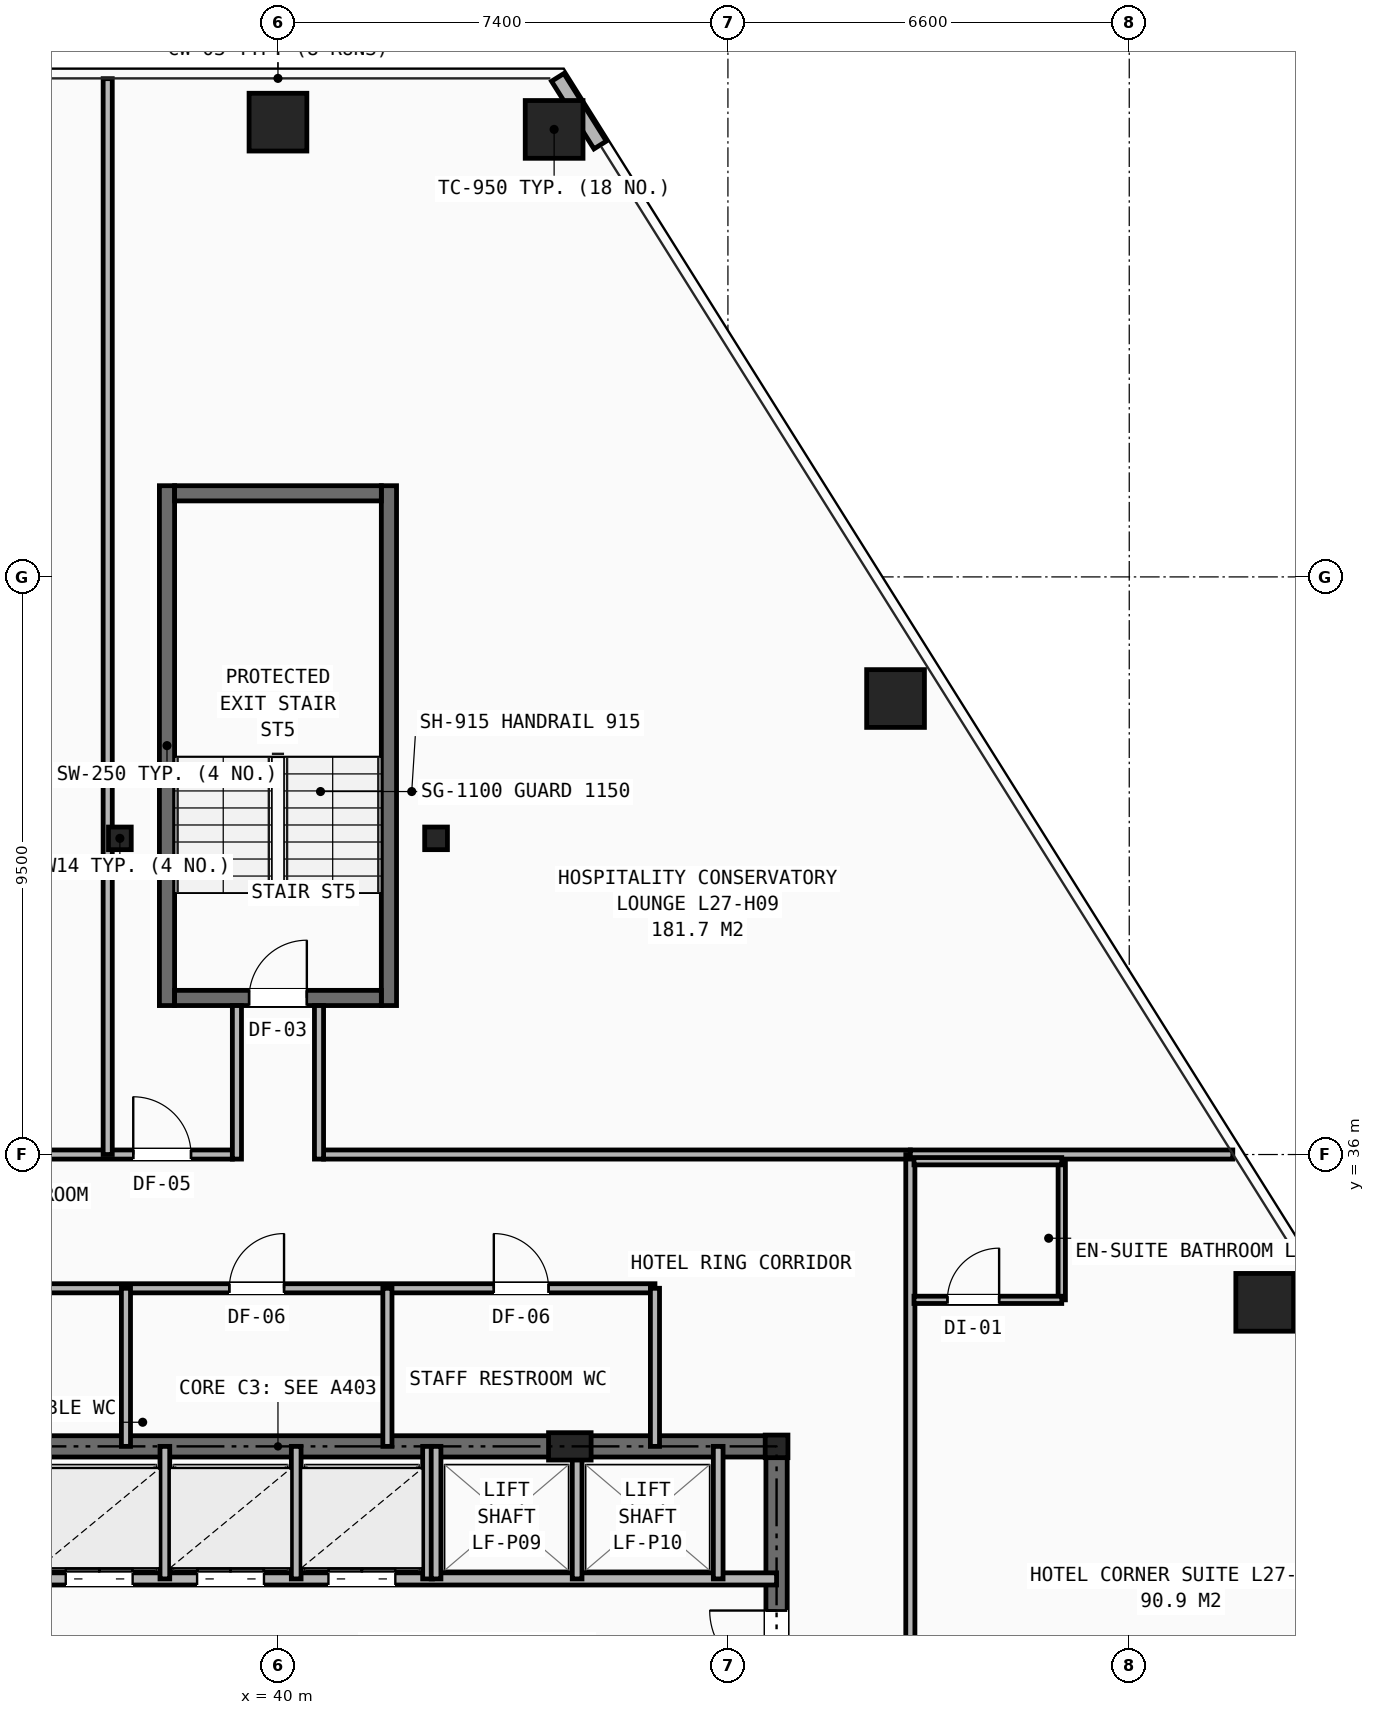
"""IFC4 building model, lengths in metres.
Left out: names, types, materials, properties, quantities, classifications, styles, units other than length and angle.
Written with IfcOpenShell. Run it as: python <this file> out.ifc"""

import sys

from ifc_helpers import new_model, si_unit, direction, frame, frame_2d, origin, origin_2d, place, context, subcontext, project, spatial, rectangle, hollow_rectangle, i_section, extrude, element, fill, save


model = new_model("IFC4")
c1 = context("Model", 3, precision=1e-05, world=origin(), true_north=direction((0.0, 1.0)))
c2 = subcontext(c1, "Body", "Model", "MODEL_VIEW")
j1 = project(units=[si_unit("LENGTHUNIT", "METRE"), si_unit("PLANEANGLEUNIT", "RADIAN")], contexts=[c1])
p1 = place(None, origin())
s1 = spatial("IfcSite", under=j1, at=p1, CompositionType="ELEMENT")
p2 = place(p1, origin())
s2 = spatial("IfcBuilding", under=s1, at=p2, CompositionType="ELEMENT")
p3 = place(p2, frame((0.0, 0.0, 95.8)))
s3 = spatial("IfcBuildingStorey", under=s2, at=p3, CompositionType="ELEMENT", Elevation=95.8)
for number, where, z_axis, x_axis in (
    (1, (48.2, 31.2, 0.0), (0.0, 0.0, 1.0), (1.0, 0.0, 0.0)),
    (2, (37.4, 41.2, 0.0), (0.0, 0.0, 1.0), (1.0, 0.0, 0.0)),
    (3, (42.6, 41.2, 0.0), (0.0, 0.0, 1.0), (1.0, 0.0, 0.0)),
):
    element("IfcColumn", number, at=place(p3, frame(where, z_axis=z_axis, x_axis=x_axis)), inside=s3, PredefinedType="COLUMN", context=c2, shape_type="SweptSolid", body=[
        extrude(i_section(OverallWidth=0.374, OverallDepth=0.372, WebThickness=0.016, FlangeThickness=0.026, at=origin_2d()), origin(), (0.0, 0.0, 1.0), 3.2),
    ])
p4 = place(p3, frame((44.8, 31.2, 0.0), z_axis=(0.0, 0.0, 1.0), x_axis=(1.0, 0.0, 0.0)))
e4 = element("IfcColumn", 4, at=p4, inside=s3, PredefinedType="PILASTER", context=c2, shape_type="SweptSolid", body=[
    extrude(rectangle(XDim=0.7, YDim=0.45, at=origin_2d()), origin(), (0.0, 0.0, 1.0), 3.2),
])
for number, where, z_axis, x_axis in (
    (5, (44.542, 52.86, 0.0), (0.0, 0.0, 1.0), (1.0, 0.0, 0.0)),
    (6, (40.0, 52.979, 0.0), (0.0, 0.0, 1.0), (1.0, 0.0, 0.0)),
    (7, (56.228, 33.569, 0.0), (0.0, 0.0, 1.0), (1.0, 0.0, 0.0)),
    (8, (50.156, 43.5, 0.0), (0.0, 0.0, 1.0), (1.0, 0.0, 0.0)),
):
    element("IfcColumn", number, at=place(p3, frame(where, z_axis=z_axis, x_axis=x_axis)), inside=s3, PredefinedType="COLUMN", context=c2, shape_type="SweptSolid", body=[
        extrude(hollow_rectangle(XDim=0.95, YDim=0.95, WallThickness=0.065, at=origin_2d()), origin(), (0.0, 0.0, 1.0), 3.2),
    ])
p5 = place(p3, frame((45.299, 52.603, 0.0), z_axis=(0.0, 0.0, 1.0), x_axis=(-0.531234768042, 0.847224658059, 0.0)))
e9 = element("IfcWall", 9, at=p5, inside=s3, PredefinedType="SHEAR", context=c2, shape_type="SweptSolid", body=[
    extrude(rectangle(XDim=1.313, YDim=0.24, at=frame_2d((0.657, 0.0))), origin(), (0.0, 0.0, 1.0), 2.253),
])
p6 = place(p3, frame((31.8, 31.2, 0.0), z_axis=(0.0, 0.0, 1.0), x_axis=(1.0, 0.0, 0.0)))
e10 = element("IfcWall", 10, at=p6, inside=s3, PredefinedType="SHEAR", context=c2, shape_type="SweptSolid", body=[
    extrude(rectangle(XDim=16.4, YDim=0.35, at=frame_2d((8.2, 0.0))), origin(), (0.0, 0.0, 1.0), 2.97),
])
p7 = place(p3, frame((48.2, 16.4, 0.0), z_axis=(0.0, 0.0, 1.0), x_axis=(0.0, 1.0, 0.0)))
e11 = element("IfcWall", 11, at=p7, inside=s3, PredefinedType="SHEAR", context=c2, shape_type="SweptSolid", body=[
    extrude(rectangle(XDim=14.8, YDim=0.35, at=frame_2d((7.4, 0.0))), origin(), (0.0, 0.0, 1.0), 2.97),
])
p8 = place(p7, frame((11.0, 0.0, 0.0)))
e12 = element("IfcOpeningElement", 12, at=p8, cuts=e11, PredefinedType="OPENING", context=c2, shape_type="SweptSolid", body=[
    extrude(rectangle(XDim=1.1, YDim=2.15, at=frame_2d((0.55, 1.075))), frame((0.0, 0.185, 0.0), z_axis=(0.0, -1.0, 0.0), x_axis=(1.0, 0.0, 0.0)), (0.0, 0.0, 1.0), 0.37),
])
p9 = place(p3, frame((33.82, 29.02, 0.0), z_axis=(0.0, 0.0, 1.0), x_axis=(1.0, 0.0, 0.0)))
e13 = element("IfcWall", 13, at=p9, inside=s3, PredefinedType="SOLIDWALL", context=c2, shape_type="SweptSolid", body=[
    extrude(rectangle(XDim=14.38, YDim=0.2, at=frame_2d((7.19, 0.0))), origin(), (0.0, 0.0, 1.0), 2.421),
])
p10 = place(p9, frame((0.53, 0.0, 0.0)))
e14 = element("IfcOpeningElement", 14, at=p10, cuts=e13, PredefinedType="OPENING", context=c2, shape_type="SweptSolid", body=[
    extrude(rectangle(XDim=1.1, YDim=2.15, at=frame_2d((0.55, 1.075))), frame((0.0, 0.11, 0.0), z_axis=(0.0, -1.0, 0.0), x_axis=(1.0, 0.0, 0.0)), (0.0, 0.0, 1.0), 0.22),
])
p11 = place(p9, frame((2.69, 0.0, 0.0)))
e15 = element("IfcOpeningElement", 15, at=p11, cuts=e13, PredefinedType="OPENING", context=c2, shape_type="SweptSolid", body=[
    extrude(rectangle(XDim=1.1, YDim=2.15, at=frame_2d((0.55, 1.075))), frame((0.0, 0.11, 0.0), z_axis=(0.0, -1.0, 0.0), x_axis=(1.0, 0.0, 0.0)), (0.0, 0.0, 1.0), 0.22),
])
p12 = place(p9, frame((4.85, 0.0, 0.0)))
e16 = element("IfcOpeningElement", 16, at=p12, cuts=e13, PredefinedType="OPENING", context=c2, shape_type="SweptSolid", body=[
    extrude(rectangle(XDim=1.1, YDim=2.15, at=frame_2d((0.55, 1.075))), frame((0.0, 0.11, 0.0), z_axis=(0.0, -1.0, 0.0), x_axis=(1.0, 0.0, 0.0)), (0.0, 0.0, 1.0), 0.22),
])
p13 = place(p9, frame((7.01, 0.0, 0.0)))
e17 = element("IfcOpeningElement", 17, at=p13, cuts=e13, PredefinedType="OPENING", context=c2, shape_type="SweptSolid", body=[
    extrude(rectangle(XDim=1.1, YDim=2.15, at=frame_2d((0.55, 1.075))), frame((0.0, 0.11, 0.0), z_axis=(0.0, -1.0, 0.0), x_axis=(1.0, 0.0, 0.0)), (0.0, 0.0, 1.0), 0.22),
])
for number, where, z_axis, x_axis in (
    (18, (38.14, 29.02, 0.0), (0.0, 0.0, 1.0), (0.0, 1.0, 0.0)),
    (19, (40.3, 29.02, 0.0), (0.0, 0.0, 1.0), (0.0, 1.0, 0.0)),
    (20, (42.46, 29.02, 0.0), (0.0, 0.0, 1.0), (0.0, 1.0, 0.0)),
    (21, (42.6, 29.02, 0.0), (0.0, 0.0, 1.0), (0.0, 1.0, 0.0)),
    (22, (44.92, 29.02, 0.0), (0.0, 0.0, 1.0), (0.0, 1.0, 0.0)),
    (23, (47.24, 29.02, 0.0), (0.0, 0.0, 1.0), (0.0, 1.0, 0.0)),
):
    element("IfcWall", number, at=place(p3, frame(where, z_axis=z_axis, x_axis=x_axis)), inside=s3, PredefinedType="SOLIDWALL", context=c2, shape_type="SweptSolid", body=[
        extrude(rectangle(XDim=2.18, YDim=0.16, at=frame_2d((1.09, 0.0))), origin(), (0.0, 0.0, 1.0), 2.421),
    ])
p14 = place(p3, frame((33.2, 33.8, 0.0), z_axis=(0.0, 0.0, 1.0), x_axis=(1.0, 0.0, 0.0)))
e24 = element("IfcWall", 24, at=p14, inside=s3, PredefinedType="PARTITIONING", context=c2, shape_type="SweptSolid", body=[
    extrude(rectangle(XDim=13.0, YDim=0.15, at=frame_2d((6.5, 0.0))), origin(), (0.0, 0.0, 1.0), 2.97),
])
p15 = place(p14, frame((1.7, 0.0, 0.0)))
e25 = element("IfcOpeningElement", 25, at=p15, cuts=e24, PredefinedType="OPENING", context=c2, shape_type="SweptSolid", body=[
    extrude(rectangle(XDim=0.9, YDim=2.1, at=frame_2d((0.45, 1.05))), frame((0.0, 0.085, 0.0), z_axis=(0.0, -1.0, 0.0), x_axis=(1.0, 0.0, 0.0)), (0.0, 0.0, 1.0), 0.17),
])
p16 = place(p14, frame((6.0, 0.0, 0.0)))
e26 = element("IfcOpeningElement", 26, at=p16, cuts=e24, PredefinedType="OPENING", context=c2, shape_type="SweptSolid", body=[
    extrude(rectangle(XDim=0.9, YDim=2.1, at=frame_2d((0.45, 1.05))), frame((0.0, 0.085, 0.0), z_axis=(0.0, -1.0, 0.0), x_axis=(1.0, 0.0, 0.0)), (0.0, 0.0, 1.0), 0.17),
])
p17 = place(p14, frame((10.35, 0.0, 0.0)))
e27 = element("IfcOpeningElement", 27, at=p17, cuts=e24, PredefinedType="OPENING", context=c2, shape_type="SweptSolid", body=[
    extrude(rectangle(XDim=0.9, YDim=2.1, at=frame_2d((0.45, 1.05))), frame((0.0, 0.085, 0.0), z_axis=(0.0, -1.0, 0.0), x_axis=(1.0, 0.0, 0.0)), (0.0, 0.0, 1.0), 0.17),
])
for number, where, z_axis, x_axis in (
    (28, (46.2, 31.2, 0.0), (0.0, 0.0, 1.0), (0.0, 1.0, 0.0)),
    (29, (37.5, 31.2, 0.0), (0.0, 0.0, 1.0), (0.0, 1.0, 0.0)),
    (30, (41.8, 31.2, 0.0), (0.0, 0.0, 1.0), (0.0, 1.0, 0.0)),
):
    element("IfcWall", number, at=place(p3, frame(where, z_axis=z_axis, x_axis=x_axis)), inside=s3, PredefinedType="PARTITIONING", context=c2, shape_type="SweptSolid", body=[
        extrude(rectangle(XDim=2.6, YDim=0.15, at=frame_2d((1.3, 0.0))), origin(), (0.0, 0.0, 1.0), 2.421),
    ])
p18 = place(p3, frame((29.6, 36.0, 0.0), z_axis=(0.0, 0.0, 1.0), x_axis=(1.0, 0.0, 0.0)))
e31 = element("IfcWall", 31, at=p18, inside=s3, PredefinedType="PARTITIONING", context=c2, shape_type="SweptSolid", body=[
    extrude(rectangle(XDim=9.65, YDim=0.15, at=frame_2d((4.825, 0.0))), origin(), (0.0, 0.0, 1.0), 2.503),
])
p19 = place(p18, frame((0.57, 0.0, 0.0)))
e32 = element("IfcOpeningElement", 32, at=p19, cuts=e31, PredefinedType="OPENING", context=c2, shape_type="SweptSolid", body=[
    extrude(rectangle(XDim=0.95, YDim=2.1, at=frame_2d((0.475, 1.05))), frame((0.0, 0.085, 0.0), z_axis=(0.0, -1.0, 0.0), x_axis=(1.0, 0.0, 0.0)), (0.0, 0.0, 1.0), 0.17),
])
p20 = place(p18, frame((8.02, 0.0, 0.0)))
e33 = element("IfcOpeningElement", 33, at=p20, cuts=e31, PredefinedType="OPENING", context=c2, shape_type="SweptSolid", body=[
    extrude(rectangle(XDim=0.95, YDim=2.1, at=frame_2d((0.475, 1.05))), frame((0.0, 0.085, 0.0), z_axis=(0.0, -1.0, 0.0), x_axis=(1.0, 0.0, 0.0)), (0.0, 0.0, 1.0), 0.17),
])
p21 = place(p3, frame((40.75, 36.0, 0.0), z_axis=(0.0, 0.0, 1.0), x_axis=(1.0, 0.0, 0.0)))
e34 = element("IfcWall", 34, at=p21, inside=s3, PredefinedType="PARTITIONING", context=c2, shape_type="SweptSolid", body=[
    extrude(rectangle(XDim=9.65, YDim=0.15, at=frame_2d((4.825, 0.0))), origin(), (0.0, 0.0, 1.0), 2.503),
])
p22 = place(p3, frame((50.4, 14.1, 0.0), z_axis=(0.0, 0.0, 1.0), x_axis=(0.0, 1.0, 0.0)))
e35 = element("IfcWall", 35, at=p22, inside=s3, PredefinedType="PARTITIONING", context=c2, shape_type="SweptSolid", body=[
    extrude(rectangle(XDim=21.9, YDim=0.15, at=frame_2d((10.95, 0.0))), origin(), (0.0, 0.0, 1.0), 2.421),
])
p23 = place(p22, frame((0.42, 0.0, 0.0)))
e36 = element("IfcOpeningElement", 36, at=p23, cuts=e35, PredefinedType="OPENING", context=c2, shape_type="SweptSolid", body=[
    extrude(rectangle(XDim=0.95, YDim=2.1, at=frame_2d((0.475, 1.05))), frame((0.0, 0.085, 0.0), z_axis=(0.0, -1.0, 0.0), x_axis=(1.0, 0.0, 0.0)), (0.0, 0.0, 1.0), 0.17),
])
p24 = place(p22, frame((10.82, 0.0, 0.0)))
e37 = element("IfcOpeningElement", 37, at=p24, cuts=e35, PredefinedType="OPENING", context=c2, shape_type="SweptSolid", body=[
    extrude(rectangle(XDim=0.95, YDim=2.1, at=frame_2d((0.475, 1.05))), frame((0.0, 0.085, 0.0), z_axis=(0.0, -1.0, 0.0), x_axis=(1.0, 0.0, 0.0)), (0.0, 0.0, 1.0), 0.17),
])
p25 = place(p3, frame((50.4, 36.0, 0.0), z_axis=(0.0, 0.0, 1.0), x_axis=(1.0, 0.0, 0.0)))
e38 = element("IfcWall", 38, at=p25, inside=s3, PredefinedType="PARTITIONING", context=c2, shape_type="SweptSolid", body=[
    extrude(rectangle(XDim=5.303, YDim=0.15, at=frame_2d((2.651, 0.0))), origin(), (0.0, 0.0, 1.0), 2.258),
])
p26 = place(p3, frame((52.89, 33.61, 0.0), z_axis=(0.0, 0.0, 1.0), x_axis=(0.0, 1.0, 0.0)))
e39 = element("IfcWall", 39, at=p26, inside=s3, PredefinedType="PARTITIONING", context=c2, shape_type="SweptSolid", body=[
    extrude(rectangle(XDim=2.28, YDim=0.12, at=frame_2d((1.14, 0.0))), origin(), (0.0, 0.0, 1.0), 2.97),
])
p27 = place(p3, frame((50.46, 33.61, 0.0), z_axis=(0.0, 0.0, 1.0), x_axis=(1.0, 0.0, 0.0)))
e40 = element("IfcWall", 40, at=p27, inside=s3, PredefinedType="PARTITIONING", context=c2, shape_type="SweptSolid", body=[
    extrude(rectangle(XDim=2.43, YDim=0.12, at=frame_2d((1.215, 0.0))), origin(), (0.0, 0.0, 1.0), 2.503),
])
p28 = place(p27, frame((0.55, 0.0, 0.0)))
e41 = element("IfcOpeningElement", 41, at=p28, cuts=e40, PredefinedType="OPENING", context=c2, shape_type="SweptSolid", body=[
    extrude(rectangle(XDim=0.85, YDim=2.05, at=frame_2d((0.425, 1.025))), frame((0.0, 0.07, 0.0), z_axis=(0.0, -1.0, 0.0), x_axis=(1.0, 0.0, 0.0)), (0.0, 0.0, 1.0), 0.14),
])
p29 = place(p3, frame((50.46, 35.89, 0.0), z_axis=(0.0, 0.0, 1.0), x_axis=(1.0, 0.0, 0.0)))
e42 = element("IfcWall", 42, at=p29, inside=s3, PredefinedType="PARTITIONING", context=c2, shape_type="SweptSolid", body=[
    extrude(rectangle(XDim=2.43, YDim=0.12, at=frame_2d((1.215, 0.0))), origin(), (0.0, 0.0, 1.0), 2.97),
])
p30 = place(p3, frame((37.2, 36.0, 0.0), z_axis=(0.0, 0.0, 1.0), x_axis=(0.0, 1.0, 0.0)))
e43 = element("IfcWall", 43, at=p30, inside=s3, PredefinedType="PARTITIONING", context=c2, shape_type="SweptSolid", body=[
    extrude(rectangle(XDim=17.694, YDim=0.15, at=frame_2d((8.847, 0.0))), origin(), (0.0, 0.0, 1.0), 2.258),
])
for number, where, z_axis, x_axis in (
    (44, (38.175, 38.45, 0.0), (0.0, 0.0, 1.0), (0.0, 1.0, 0.0)),
    (45, (41.825, 38.45, 0.0), (0.0, 0.0, 1.0), (0.0, 1.0, 0.0)),
):
    element("IfcWall", number, at=place(p3, frame(where, z_axis=z_axis, x_axis=x_axis)), inside=s3, PredefinedType="SHEAR", context=c2, shape_type="SweptSolid", body=[
        extrude(rectangle(XDim=8.55, YDim=0.25, at=frame_2d((4.275, 0.0))), origin(), (0.0, 0.0, 1.0), 2.97),
    ])
p31 = place(p3, frame((38.3, 38.575, 0.0), z_axis=(0.0, 0.0, 1.0), x_axis=(1.0, 0.0, 0.0)))
e46 = element("IfcWall", 46, at=p31, inside=s3, PredefinedType="SHEAR", context=c2, shape_type="SweptSolid", body=[
    extrude(rectangle(XDim=3.4, YDim=0.25, at=frame_2d((1.7, 0.0))), origin(), (0.0, 0.0, 1.0), 2.97),
])
p32 = place(p31, frame((1.225, 0.0, 0.0)))
e47 = element("IfcOpeningElement", 47, at=p32, cuts=e46, PredefinedType="OPENING", context=c2, shape_type="SweptSolid", body=[
    extrude(rectangle(XDim=0.95, YDim=2.1, at=frame_2d((0.475, 1.05))), frame((0.0, 0.135, 0.0), z_axis=(0.0, -1.0, 0.0), x_axis=(1.0, 0.0, 0.0)), (0.0, 0.0, 1.0), 0.27),
])
p33 = place(p3, frame((38.3, 46.875, 0.0), z_axis=(0.0, 0.0, 1.0), x_axis=(1.0, 0.0, 0.0)))
e48 = element("IfcWall", 48, at=p33, inside=s3, PredefinedType="SHEAR", context=c2, shape_type="SweptSolid", body=[
    extrude(rectangle(XDim=3.4, YDim=0.25, at=frame_2d((1.7, 0.0))), origin(), (0.0, 0.0, 1.0), 2.97),
])
for number, where, z_axis, x_axis in (
    (49, (39.325, 35.925, 0.0), (0.0, 0.0, 1.0), (0.0, 1.0, 0.0)),
    (50, (40.675, 35.925, 0.0), (0.0, 0.0, 1.0), (0.0, 1.0, 0.0)),
):
    element("IfcWall", number, at=place(p3, frame(where, z_axis=z_axis, x_axis=x_axis)), inside=s3, PredefinedType="PARTITIONING", context=c2, shape_type="SweptSolid", body=[
        extrude(rectangle(XDim=2.525, YDim=0.15, at=frame_2d((1.262, 0.0))), origin(), (0.0, 0.0, 1.0), 2.97),
    ])
p34 = place(p8, origin())
e51 = element("IfcDoor", 51, at=p34, inside=s3, OperationType="SINGLE_SWING_RIGHT", PredefinedType="DOOR", context=c2, shape_type="SweptSolid", body=[
    extrude(rectangle(XDim=1.1, YDim=2.15, at=frame_2d((0.55, 1.075))), frame((0.0, 0.025, 0.0), z_axis=(0.0, -1.0, 0.0), x_axis=(1.0, 0.0, 0.0)), (0.0, 0.0, 1.0), 0.05),
])
fill(e12, e51)
p35 = place(p11, origin())
e52 = element("IfcDoor", 52, at=p35, inside=s3, OperationType="DOUBLE_DOOR_SLIDING", PredefinedType="DOOR", context=c2, shape_type="SweptSolid", body=[
    extrude(rectangle(XDim=1.1, YDim=2.15, at=frame_2d((0.55, 1.075))), frame((0.0, 0.025, 0.0), z_axis=(0.0, -1.0, 0.0), x_axis=(1.0, 0.0, 0.0)), (0.0, 0.0, 1.0), 0.05),
])
fill(e15, e52)
p36 = place(p12, origin())
e53 = element("IfcDoor", 53, at=p36, inside=s3, OperationType="DOUBLE_DOOR_SLIDING", PredefinedType="DOOR", context=c2, shape_type="SweptSolid", body=[
    extrude(rectangle(XDim=1.1, YDim=2.15, at=frame_2d((0.55, 1.075))), frame((0.0, 0.025, 0.0), z_axis=(0.0, -1.0, 0.0), x_axis=(1.0, 0.0, 0.0)), (0.0, 0.0, 1.0), 0.05),
])
fill(e16, e53)
p37 = place(p13, origin())
e54 = element("IfcDoor", 54, at=p37, inside=s3, OperationType="DOUBLE_DOOR_SLIDING", PredefinedType="DOOR", context=c2, shape_type="SweptSolid", body=[
    extrude(rectangle(XDim=1.1, YDim=2.15, at=frame_2d((0.55, 1.075))), frame((0.0, 0.025, 0.0), z_axis=(0.0, -1.0, 0.0), x_axis=(1.0, 0.0, 0.0)), (0.0, 0.0, 1.0), 0.05),
])
fill(e17, e54)
p38 = place(p16, origin())
e55 = element("IfcDoor", 55, at=p38, inside=s3, OperationType="SINGLE_SWING_RIGHT", PredefinedType="DOOR", context=c2, shape_type="SweptSolid", body=[
    extrude(rectangle(XDim=0.9, YDim=2.1, at=frame_2d((0.45, 1.05))), frame((0.0, 0.025, 0.0), z_axis=(0.0, -1.0, 0.0), x_axis=(1.0, 0.0, 0.0)), (0.0, 0.0, 1.0), 0.05),
])
fill(e26, e55)
p39 = place(p17, origin())
e56 = element("IfcDoor", 56, at=p39, inside=s3, OperationType="SINGLE_SWING_LEFT", PredefinedType="DOOR", context=c2, shape_type="SweptSolid", body=[
    extrude(rectangle(XDim=0.9, YDim=2.1, at=frame_2d((0.45, 1.05))), frame((0.0, 0.025, 0.0), z_axis=(0.0, -1.0, 0.0), x_axis=(1.0, 0.0, 0.0)), (0.0, 0.0, 1.0), 0.05),
])
fill(e27, e56)
p40 = place(p28, origin())
e57 = element("IfcDoor", 57, at=p40, inside=s3, OperationType="SINGLE_SWING_RIGHT", PredefinedType="DOOR", context=c2, shape_type="SweptSolid", body=[
    extrude(rectangle(XDim=0.85, YDim=2.05, at=frame_2d((0.425, 1.025))), frame((0.0, 0.025, 0.0), z_axis=(0.0, -1.0, 0.0), x_axis=(1.0, 0.0, 0.0)), (0.0, 0.0, 1.0), 0.05),
])
fill(e41, e57)
p41 = place(p20, origin())
e58 = element("IfcDoor", 58, at=p41, inside=s3, OperationType="SINGLE_SWING_LEFT", PredefinedType="DOOR", context=c2, shape_type="SweptSolid", body=[
    extrude(rectangle(XDim=0.95, YDim=2.1, at=frame_2d((0.475, 1.05))), frame((0.0, 0.025, 0.0), z_axis=(0.0, -1.0, 0.0), x_axis=(1.0, 0.0, 0.0)), (0.0, 0.0, 1.0), 0.05),
])
fill(e33, e58)
p42 = place(p32, origin())
e59 = element("IfcDoor", 59, at=p42, inside=s3, OperationType="SINGLE_SWING_RIGHT", PredefinedType="DOOR", context=c2, shape_type="SweptSolid", body=[
    extrude(rectangle(XDim=0.95, YDim=2.1, at=frame_2d((0.475, 1.05))), frame((0.0, 0.025, 0.0), z_axis=(0.0, -1.0, 0.0), x_axis=(1.0, 0.0, 0.0)), (0.0, 0.0, 1.0), 0.05),
])
fill(e47, e59)
save(model, sys.argv[1])
